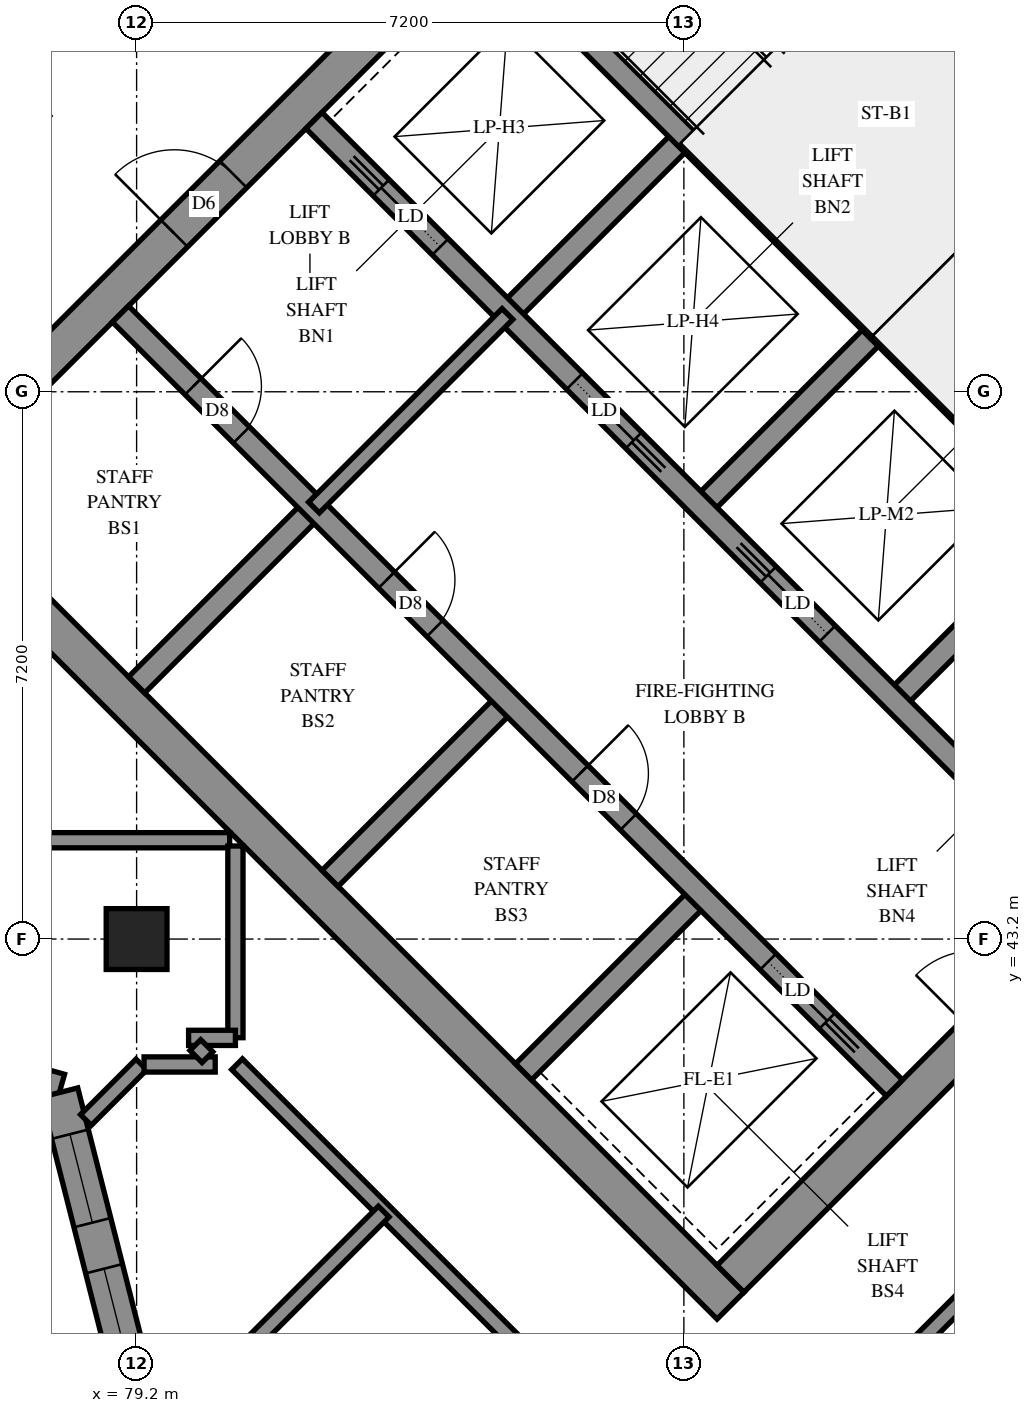
"""IFC4 building model, lengths in metres.
Left out: names, types, materials, properties, quantities, classifications, styles, units other than length and angle.
Written with IfcOpenShell. Run it as: python <this file> out.ifc"""

import sys

from ifc_helpers import new_model, si_unit, direction, frame, frame_2d, origin, origin_2d, place, context, subcontext, project, spatial, polyline, rectangle, outline, extrude, element, fill, save


model = new_model("IFC4")
c1 = context("Model", 3, precision=1e-05, world=origin(), true_north=direction((0.0, 1.0)))
c2 = subcontext(c1, "Body", "Model", "MODEL_VIEW")
j1 = project(units=[si_unit("LENGTHUNIT", "METRE"), si_unit("PLANEANGLEUNIT", "RADIAN")], contexts=[c1])
p1 = place(None, origin())
s1 = spatial("IfcSite", under=j1, at=p1, CompositionType="ELEMENT")
p2 = place(p1, origin())
s2 = spatial("IfcBuilding", under=s1, at=p2, CompositionType="ELEMENT")
p3 = place(p2, frame((0.0, 0.0, 203.2)))
s3 = spatial("IfcBuildingStorey", under=s2, at=p3, CompositionType="ELEMENT", Elevation=203.2)
p4 = place(p3, frame((79.2, 43.2, 0.0), z_axis=(0.0, 0.0, 1.0), x_axis=(1.0, 0.0, 0.0)))
e1 = element("IfcColumn", 1, at=p4, inside=s3, PredefinedType="COLUMN", context=c2, shape_type="SweptSolid", body=[
    extrude(rectangle(XDim=0.8, YDim=0.8, at=origin_2d()), origin(), (0.0, 0.0, 1.0), 3.1),
])
p5 = place(p3, frame((76.124, 49.267, -0.3), z_axis=(0.0, 0.0, 1.0), x_axis=(0.7071067812, -0.7071067812, 0.0)))
e2 = element("IfcWall", 2, at=p5, inside=s3, PredefinedType="SHEAR", context=c2, shape_type="SweptSolid", body=[
    extrude(rectangle(XDim=15.4, YDim=0.5, at=frame_2d((7.7, 0.0))), origin(), (0.0, 0.0, 1.0), 2.7),
])
p6 = place(p3, frame((86.66, 59.802, -0.3), z_axis=(0.0, 0.0, 1.0), x_axis=(0.7071067812, -0.7071067812, 0.0)))
e3 = element("IfcWall", 3, at=p6, inside=s3, PredefinedType="SHEAR", context=c2, shape_type="SweptSolid", body=[
    extrude(rectangle(XDim=15.4, YDim=0.5, at=frame_2d((7.7, 0.0))), origin(), (0.0, 0.0, 1.0), 2.7),
])
p7 = place(p6, frame((10.5, 0.0, 0.3)))
e4 = element("IfcOpeningElement", 4, at=p7, cuts=e3, PredefinedType="OPENING", context=c2, shape_type="SweptSolid", body=[
    extrude(rectangle(XDim=0.8, YDim=2.1, at=frame_2d((0.4, 1.05))), frame((0.0, 0.26, 0.0), z_axis=(0.0, -1.0, 0.0), x_axis=(1.0, 0.0, 0.0)), (0.0, 0.0, 1.0), 0.52),
])
p8 = place(p3, frame((76.478, 49.267, -0.3), z_axis=(0.0, 0.0, 1.0), x_axis=(0.7071067812, 0.7071067812, 0.0)))
e5 = element("IfcWall", 5, at=p8, inside=s3, PredefinedType="SHEAR", context=c2, shape_type="SweptSolid", body=[
    extrude(rectangle(XDim=14.4, YDim=0.5, at=frame_2d((7.2, 0.0))), origin(), (0.0, 0.0, 1.0), 2.7),
])
p9 = place(p8, frame((4.55, 0.0, 0.3)))
e6 = element("IfcOpeningElement", 6, at=p9, cuts=e5, PredefinedType="OPENING", context=c2, shape_type="SweptSolid", body=[
    extrude(rectangle(XDim=1.1, YDim=2.1, at=frame_2d((0.55, 1.05))), frame((0.0, 0.26, 0.0), z_axis=(0.0, -1.0, 0.0), x_axis=(1.0, 0.0, 0.0)), (0.0, 0.0, 1.0), 0.52),
])
p10 = place(p8, frame((11.35, 0.0, 0.3)))
e7 = element("IfcOpeningElement", 7, at=p10, cuts=e5, PredefinedType="OPENING", context=c2, shape_type="SweptSolid", body=[
    extrude(rectangle(XDim=1.1, YDim=2.1, at=frame_2d((0.55, 1.05))), frame((0.0, 0.26, 0.0), z_axis=(0.0, -1.0, 0.0), x_axis=(1.0, 0.0, 0.0)), (0.0, 0.0, 1.0), 0.52),
])
p11 = place(p3, frame((87.013, 38.731, -0.3), z_axis=(0.0, 0.0, 1.0), x_axis=(0.7071067812, 0.7071067812, 0.0)))
e8 = element("IfcWall", 8, at=p11, inside=s3, PredefinedType="SHEAR", context=c2, shape_type="SweptSolid", body=[
    extrude(rectangle(XDim=14.4, YDim=0.5, at=frame_2d((7.2, 0.0))), origin(), (0.0, 0.0, 1.0), 2.7),
])
p12 = place(p11, frame((4.55, 0.0, 0.3)))
e9 = element("IfcOpeningElement", 9, at=p12, cuts=e8, PredefinedType="OPENING", context=c2, shape_type="SweptSolid", body=[
    extrude(rectangle(XDim=1.1, YDim=2.1, at=frame_2d((0.55, 1.05))), frame((0.0, 0.26, 0.0), z_axis=(0.0, -1.0, 0.0), x_axis=(1.0, 0.0, 0.0)), (0.0, 0.0, 1.0), 0.52),
])
p13 = place(p11, frame((11.35, 0.0, 0.3)))
e10 = element("IfcOpeningElement", 10, at=p13, cuts=e8, PredefinedType="OPENING", context=c2, shape_type="SweptSolid", body=[
    extrude(rectangle(XDim=1.1, YDim=2.1, at=frame_2d((0.55, 1.05))), frame((0.0, 0.26, 0.0), z_axis=(0.0, -1.0, 0.0), x_axis=(1.0, 0.0, 0.0)), (0.0, 0.0, 1.0), 0.52),
])
for number, where, z_axis, x_axis in (
    (11, (79.2, 46.544, 0.0), (0.0, 0.0, 1.0), (0.707, 0.707, 0.0)),
    (12, (84.079, 51.423, 0.0), (0.0, 0.0, 1.0), (0.707, 0.707, 0.0)),
):
    element("IfcWall", number, at=place(p3, frame(where, z_axis=z_axis, x_axis=x_axis)), inside=s3, PredefinedType="SOLIDWALL", context=c2, shape_type="SweptSolid", body=[
        extrude(rectangle(XDim=3.3, YDim=0.3, at=frame_2d((1.65, 0.0))), origin(), (0.0, 0.0, 1.0), 3.1),
    ])
p14 = place(p3, frame((81.746, 43.999, 0.0), z_axis=(0.0, 0.0, 1.0), x_axis=(0.7071067812, 0.7071067812, 0.0)))
e13 = element("IfcWall", 13, at=p14, inside=s3, PredefinedType="SOLIDWALL", context=c2, shape_type="SweptSolid", body=[
    extrude(rectangle(XDim=3.3, YDim=0.3, at=frame_2d((1.65, 0.0))), origin(), (0.0, 0.0, 1.0), 3.1),
])
p15 = place(p3, frame((86.625, 48.878, 0.0), z_axis=(0.0, 0.0, 1.0), x_axis=(0.7071067812, 0.7071067812, 0.0)))
e14 = element("IfcWall", 14, at=p15, inside=s3, PredefinedType="SOLIDWALL", context=c2, shape_type="SweptSolid", body=[
    extrude(rectangle(XDim=3.3, YDim=0.3, at=frame_2d((1.65, 0.0))), origin(), (0.0, 0.0, 1.0), 3.1),
])
p16 = place(p3, frame((84.291, 41.453, 0.0), z_axis=(0.0, 0.0, 1.0), x_axis=(0.7071067812, 0.7071067812, 0.0)))
e15 = element("IfcWall", 15, at=p16, inside=s3, PredefinedType="SOLIDWALL", context=c2, shape_type="SweptSolid", body=[
    extrude(rectangle(XDim=3.3, YDim=0.3, at=frame_2d((1.65, 0.0))), origin(), (0.0, 0.0, 1.0), 3.1),
])
p17 = place(p3, frame((89.17, 46.332, 0.0), z_axis=(0.0, 0.0, 1.0), x_axis=(0.7071067812, 0.7071067812, 0.0)))
e16 = element("IfcWall", 16, at=p17, inside=s3, PredefinedType="SOLIDWALL", context=c2, shape_type="SweptSolid", body=[
    extrude(rectangle(XDim=3.3, YDim=0.3, at=frame_2d((1.65, 0.0))), origin(), (0.0, 0.0, 1.0), 3.1),
])
p18 = place(p3, frame((78.988, 51.423, 0.0), z_axis=(0.0, 0.0, 1.0), x_axis=(0.7071067812, -0.7071067812, 0.0)))
e17 = element("IfcWall", 17, at=p18, inside=s3, PredefinedType="SOLIDWALL", context=c2, shape_type="SweptSolid", body=[
    extrude(rectangle(XDim=14.4, YDim=0.3, at=frame_2d((7.2, 0.0))), origin(), (0.0, 0.0, 1.0), 3.1),
])
p19 = place(p18, frame((1.35, 0.0, 0.0)))
e18 = element("IfcOpeningElement", 18, at=p19, cuts=e17, PredefinedType="OPENING", context=c2, shape_type="SweptSolid", body=[
    extrude(rectangle(XDim=0.9, YDim=2.1, at=frame_2d((0.45, 1.05))), frame((0.0, 0.16, 0.0), z_axis=(0.0, -1.0, 0.0), x_axis=(1.0, 0.0, 0.0)), (0.0, 0.0, 1.0), 0.32),
])
p20 = place(p18, frame((4.95, 0.0, 0.0)))
e19 = element("IfcOpeningElement", 19, at=p20, cuts=e17, PredefinedType="OPENING", context=c2, shape_type="SweptSolid", body=[
    extrude(rectangle(XDim=0.9, YDim=2.1, at=frame_2d((0.45, 1.05))), frame((0.0, 0.16, 0.0), z_axis=(0.0, -1.0, 0.0), x_axis=(1.0, 0.0, 0.0)), (0.0, 0.0, 1.0), 0.32),
])
p21 = place(p18, frame((8.55, 0.0, 0.0)))
e20 = element("IfcOpeningElement", 20, at=p21, cuts=e17, PredefinedType="OPENING", context=c2, shape_type="SweptSolid", body=[
    extrude(rectangle(XDim=0.9, YDim=2.1, at=frame_2d((0.45, 1.05))), frame((0.0, 0.16, 0.0), z_axis=(0.0, -1.0, 0.0), x_axis=(1.0, 0.0, 0.0)), (0.0, 0.0, 1.0), 0.32),
])
p22 = place(p18, frame((12.05, 0.0, 0.0)))
e21 = element("IfcOpeningElement", 21, at=p22, cuts=e17, PredefinedType="OPENING", context=c2, shape_type="SweptSolid", body=[
    extrude(rectangle(XDim=1.1, YDim=2.1, at=frame_2d((0.55, 1.05))), frame((0.0, 0.16, 0.0), z_axis=(0.0, -1.0, 0.0), x_axis=(1.0, 0.0, 0.0)), (0.0, 0.0, 1.0), 0.32),
])
p23 = place(p3, frame((81.534, 53.969, 0.0), z_axis=(0.0, 0.0, 1.0), x_axis=(0.707103309, -0.7071102534, 0.0)))
e22 = element("IfcWall", 22, at=p23, inside=s3, PredefinedType="SOLIDWALL", context=c2, shape_type="SweptSolid", body=[
    extrude(rectangle(XDim=14.4, YDim=0.3, at=frame_2d((7.2, 0.0))), origin(), (0.0, 0.0, 1.0), 3.1),
])
p24 = place(p23, frame((1.25, 0.0, 0.0)))
e23 = element("IfcOpeningElement", 23, at=p24, cuts=e22, PredefinedType="OPENING", context=c2, shape_type="SweptSolid", body=[
    extrude(rectangle(XDim=1.1, YDim=2.1, at=frame_2d((0.55, 1.05))), frame((0.0, 0.16, 0.0), z_axis=(0.0, -1.0, 0.0), x_axis=(1.0, 0.0, 0.0)), (0.0, 0.0, 1.0), 0.32),
])
p25 = place(p23, frame((4.85, 0.0, 0.0)))
e24 = element("IfcOpeningElement", 24, at=p25, cuts=e22, PredefinedType="OPENING", context=c2, shape_type="SweptSolid", body=[
    extrude(rectangle(XDim=1.1, YDim=2.1, at=frame_2d((0.55, 1.05))), frame((0.0, 0.16, 0.0), z_axis=(0.0, -1.0, 0.0), x_axis=(1.0, 0.0, 0.0)), (0.0, 0.0, 1.0), 0.32),
])
p26 = place(p23, frame((8.45, 0.0, 0.0)))
e25 = element("IfcOpeningElement", 25, at=p26, cuts=e22, PredefinedType="OPENING", context=c2, shape_type="SweptSolid", body=[
    extrude(rectangle(XDim=1.1, YDim=2.1, at=frame_2d((0.55, 1.05))), frame((0.0, 0.16, 0.0), z_axis=(0.0, -1.0, 0.0), x_axis=(1.0, 0.0, 0.0)), (0.0, 0.0, 1.0), 0.32),
])
p27 = place(p23, frame((12.05, 0.0, 0.0)))
e26 = element("IfcOpeningElement", 26, at=p27, cuts=e22, PredefinedType="OPENING", context=c2, shape_type="SweptSolid", body=[
    extrude(rectangle(XDim=1.1, YDim=2.1, at=frame_2d((0.55, 1.05))), frame((0.0, 0.16, 0.0), z_axis=(0.0, -1.0, 0.0), x_axis=(1.0, 0.0, 0.0)), (0.0, 0.0, 1.0), 0.32),
])
for number, where, z_axis, x_axis in (
    (27, (83.867, 56.302, 0.0), (0.0, 0.0, 1.0), (0.707, -0.707, 0.0)),
    (28, (88.958, 51.211, 0.0), (0.0, 0.0, 1.0), (0.707, -0.707, 0.0)),
):
    element("IfcWall", number, at=place(p3, frame(where, z_axis=z_axis, x_axis=x_axis)), inside=s3, PredefinedType="SOLIDWALL", context=c2, shape_type="SweptSolid", body=[
        extrude(rectangle(XDim=7.2, YDim=0.3, at=frame_2d((3.6, 0.0))), origin(), (0.0, 0.0, 1.0), 3.1),
    ])
p28 = place(p3, frame((88.958, 51.211, 0.0), z_axis=(0.0, 0.0, 1.0), x_axis=(0.7071067812, 0.7071067812, 0.0)))
e29 = element("IfcWall", 29, at=p28, inside=s3, PredefinedType="SOLIDWALL", context=c2, shape_type="SweptSolid", body=[
    extrude(rectangle(XDim=4.2, YDim=0.3, at=frame_2d((2.1, 0.0))), origin(), (0.0, 0.0, 1.0), 3.1),
])
p29 = place(p3, frame((74.4, 42.254, 0.0), z_axis=(0.0, 0.0, 1.0), x_axis=(0.9620012555, -0.2730450228, 0.0)))
e30 = element("IfcWall", 30, at=p29, inside=s3, PredefinedType="SOLIDWALL", context=c2, shape_type="SweptSolid", body=[
    extrude(outline(polyline([(0.05, -0.25), (3.789, -0.25), (4.077, 0.25), (-0.05, 0.25), (0.05, -0.25)])), origin(), (0.0, 0.0, 1.0), 3.1),
])
p30 = place(p29, frame((0.405, 0.0, 0.5)))
e31 = element("IfcOpeningElement", 31, at=p30, cuts=e30, PredefinedType="OPENING", context=c2, shape_type="SweptSolid", body=[
    extrude(rectangle(XDim=1.2, YDim=2.45, at=frame_2d((0.6, 1.225))), frame((0.0, 0.26, 0.0), z_axis=(0.0, -1.0, 0.0), x_axis=(1.0, 0.0, 0.0)), (0.0, 0.0, 1.0), 0.52),
])
p31 = place(p29, frame((2.079, 0.0, 0.45)))
e32 = element("IfcOpeningElement", 32, at=p31, cuts=e30, PredefinedType="OPENING", context=c2, shape_type="SweptSolid", body=[
    extrude(rectangle(XDim=0.8, YDim=2.5, at=frame_2d((0.4, 1.25))), frame((0.0, 0.26, 0.0), z_axis=(0.0, -1.0, 0.0), x_axis=(1.0, 0.0, 0.0)), (0.0, 0.0, 1.0), 0.52),
])
p32 = place(p3, frame((78.184, 41.18, 0.0), z_axis=(0.0, 0.0, 1.0), x_axis=(0.2459826289, -0.9692742369, 0.0)))
e33 = element("IfcWall", 33, at=p32, inside=s3, PredefinedType="SOLIDWALL", context=c2, shape_type="SweptSolid", body=[
    extrude(outline(polyline([(0.144, -0.25), (4.837, -0.25), (4.552, 0.25), (-0.144, 0.25), (0.144, -0.25)])), origin(), (0.0, 0.0, 1.0), 3.1),
])
p33 = place(p32, frame((0.565, 0.0, 0.45)))
e34 = element("IfcOpeningElement", 34, at=p33, cuts=e33, PredefinedType="OPENING", context=c2, shape_type="SweptSolid", body=[
    extrude(rectangle(XDim=1.2, YDim=2.5, at=frame_2d((0.6, 1.25))), frame((0.0, 0.26, 0.0), z_axis=(0.0, -1.0, 0.0), x_axis=(1.0, 0.0, 0.0)), (0.0, 0.0, 1.0), 0.52),
])
p34 = place(p32, frame((2.391, 0.0, 0.45)))
e35 = element("IfcOpeningElement", 35, at=p34, cuts=e33, PredefinedType="OPENING", context=c2, shape_type="SweptSolid", body=[
    extrude(rectangle(XDim=1.2, YDim=2.5, at=frame_2d((0.6, 1.25))), frame((0.0, 0.26, 0.0), z_axis=(0.0, -1.0, 0.0), x_axis=(1.0, 0.0, 0.0)), (0.0, 0.0, 1.0), 0.52),
])
p35 = place(p3, frame((81.534, 48.878, 0.0), z_axis=(0.0, 0.0, 1.0), x_axis=(0.707092892, 0.7071206701, 0.0)))
e36 = element("IfcWall", 36, at=p35, inside=s3, PredefinedType="PARTITIONING", context=c2, shape_type="SweptSolid", body=[
    extrude(rectangle(XDim=3.6, YDim=0.2, at=frame_2d((1.8, 0.0))), origin(), (0.0, 0.0, 1.0), 3.1),
])
p36 = place(p3, frame((84.99, 31.971, 0.0), z_axis=(0.0, 0.0, 1.0), x_axis=(0.7071067812, 0.7071067812, 0.0)))
e37 = element("IfcWall", 37, at=p36, inside=s3, PredefinedType="PARTITIONING", context=c2, shape_type="SweptSolid", body=[
    extrude(rectangle(XDim=8.711, YDim=0.2, at=frame_2d((4.356, 0.0))), origin(), (0.0, 0.0, 1.0), 3.1),
])
p37 = place(p3, frame((86.835, 35.231, 0.0), z_axis=(0.0, 0.0, 1.0), x_axis=(0.7071067812, 0.7071067812, 0.0)))
e38 = element("IfcWall", 38, at=p37, inside=s3, PredefinedType="PARTITIONING", context=c2, shape_type="SweptSolid", body=[
    extrude(rectangle(XDim=7.501, YDim=0.2, at=frame_2d((3.751, 0.0))), origin(), (0.0, 0.0, 1.0), 3.1),
])
p38 = place(p37, frame((6.243, 0.0, 0.0)))
e39 = element("IfcOpeningElement", 39, at=p38, cuts=e38, PredefinedType="OPENING", context=c2, shape_type="SweptSolid", body=[
    extrude(rectangle(XDim=1.0, YDim=2.1, at=frame_2d((0.5, 1.05))), frame((0.0, 0.11, 0.0), z_axis=(0.0, -1.0, 0.0), x_axis=(1.0, 0.0, 0.0)), (0.0, 0.0, 1.0), 0.22),
])
p39 = place(p3, frame((80.522, 41.553, 0.0), z_axis=(0.0, 0.0, 1.0), x_axis=(0.7071067812, -0.7071067812, 0.0)))
e40 = element("IfcWall", 40, at=p39, inside=s3, PredefinedType="PARTITIONING", context=c2, shape_type="SweptSolid", body=[
    extrude(rectangle(XDim=6.836, YDim=0.2, at=frame_2d((3.418, 0.0))), origin(), (0.0, 0.0, 1.0), 3.1),
])
p40 = place(p3, frame((79.639, 36.803, 0.0), z_axis=(0.0, 0.0, 1.0), x_axis=(0.707119353, 0.7070942092, 0.0)))
e41 = element("IfcWall", 41, at=p40, inside=s3, PredefinedType="PARTITIONING", context=c2, shape_type="SweptSolid", body=[
    extrude(rectangle(XDim=3.977, YDim=0.2, at=frame_2d((1.989, 0.0))), origin(), (0.0, 0.0, 1.0), 3.1),
])
for number, where, z_axis, x_axis in (
    (42, (77.902, 44.5, 0.0), (0.0, 0.0, 1.0), (1.0, 0.0, 0.0)),
    (43, (80.5, 41.902, 0.0), (0.0, 0.0, 1.0), (0.0, 1.0, 0.0)),
):
    element("IfcWall", number, at=place(p3, frame(where, z_axis=z_axis, x_axis=x_axis)), inside=s3, PredefinedType="PARTITIONING", context=c2, shape_type="SweptSolid", body=[
        extrude(rectangle(XDim=2.522, YDim=0.2, at=frame_2d((1.261, 0.0))), origin(), (0.0, 0.0, 1.0), 3.1),
    ])
p41 = place(p3, frame((78.533, 40.82, 0.0), z_axis=(0.0, 0.0, 1.0), x_axis=(0.7071067812, 0.7071067812, 0.0)))
e44 = element("IfcWall", 44, at=p41, inside=s3, PredefinedType="PARTITIONING", context=c2, shape_type="SweptSolid", body=[
    extrude(rectangle(XDim=1.032, YDim=0.2, at=frame_2d((0.516, 0.0))), origin(), (0.0, 0.0, 1.0), 3.1),
])
p42 = place(p3, frame((79.298, 41.55, 0.0), z_axis=(0.0, 0.0, 1.0), x_axis=(1.0, 0.0, 0.0)))
e45 = element("IfcWall", 45, at=p42, inside=s3, PredefinedType="PARTITIONING", context=c2, shape_type="SweptSolid", body=[
    extrude(rectangle(XDim=0.936, YDim=0.2, at=frame_2d((0.468, 0.0))), origin(), (0.0, 0.0, 1.0), 3.1),
])
p43 = place(p3, frame((79.884, 41.9, 0.0), z_axis=(0.0, 0.0, 1.0), x_axis=(1.0, 0.0, 0.0)))
e46 = element("IfcWall", 46, at=p43, inside=s3, PredefinedType="PARTITIONING", context=c2, shape_type="SweptSolid", body=[
    extrude(rectangle(XDim=0.616, YDim=0.2, at=frame_2d((0.308, 0.0))), origin(), (0.0, 0.0, 1.0), 3.1),
])
p44 = place(p3, frame((79.973, 41.805, 0.0), z_axis=(0.0, 0.0, 1.0), x_axis=(0.707329037, -0.7068844555, 0.0)))
e47 = element("IfcWall", 47, at=p44, inside=s3, PredefinedType="PARTITIONING", context=c2, shape_type="SweptSolid", body=[
    extrude(rectangle(XDim=0.225, YDim=0.2, at=frame_2d((0.112, 0.0))), origin(), (0.0, 0.0, 1.0), 3.1),
])
p45 = place(p33, origin())
e48 = element("IfcWindow", 48, at=p45, inside=s3, PartitioningType="SINGLE_PANEL", PredefinedType="WINDOW", context=c2, shape_type="SweptSolid", body=[
    extrude(rectangle(XDim=1.2, YDim=2.5, at=frame_2d((0.6, 1.25))), frame((0.0, 0.18, 0.0), z_axis=(0.0, -1.0, 0.0), x_axis=(1.0, 0.0, 0.0)), (0.0, 0.0, 1.0), 0.06),
])
fill(e34, e48)
p46 = place(p34, origin())
e49 = element("IfcWindow", 49, at=p46, inside=s3, PartitioningType="SINGLE_PANEL", PredefinedType="WINDOW", context=c2, shape_type="SweptSolid", body=[
    extrude(rectangle(XDim=1.2, YDim=2.5, at=frame_2d((0.6, 1.25))), frame((0.0, 0.18, 0.0), z_axis=(0.0, -1.0, 0.0), x_axis=(1.0, 0.0, 0.0)), (0.0, 0.0, 1.0), 0.06),
])
fill(e35, e49)
p47 = place(p9, origin())
e50 = element("IfcDoor", 50, at=p47, inside=s3, OperationType="DOUBLE_DOOR_SINGLE_SWING", PredefinedType="DOOR", context=c2, shape_type="SweptSolid", body=[
    extrude(rectangle(XDim=1.1, YDim=2.1, at=frame_2d((0.55, 1.05))), frame((0.0, 0.025, 0.0), z_axis=(0.0, -1.0, 0.0), x_axis=(1.0, 0.0, 0.0)), (0.0, 0.0, 1.0), 0.05),
])
fill(e6, e50)
p48 = place(p19, origin())
e51 = element("IfcDoor", 51, at=p48, inside=s3, OperationType="SINGLE_SWING_LEFT", PredefinedType="DOOR", context=c2, shape_type="SweptSolid", body=[
    extrude(rectangle(XDim=0.9, YDim=2.1, at=frame_2d((0.45, 1.05))), frame((0.0, 0.025, 0.0), z_axis=(0.0, -1.0, 0.0), x_axis=(1.0, 0.0, 0.0)), (0.0, 0.0, 1.0), 0.05),
])
fill(e18, e51)
p49 = place(p20, origin())
e52 = element("IfcDoor", 52, at=p49, inside=s3, OperationType="SINGLE_SWING_LEFT", PredefinedType="DOOR", context=c2, shape_type="SweptSolid", body=[
    extrude(rectangle(XDim=0.9, YDim=2.1, at=frame_2d((0.45, 1.05))), frame((0.0, 0.025, 0.0), z_axis=(0.0, -1.0, 0.0), x_axis=(1.0, 0.0, 0.0)), (0.0, 0.0, 1.0), 0.05),
])
fill(e19, e52)
p50 = place(p21, origin())
e53 = element("IfcDoor", 53, at=p50, inside=s3, OperationType="SINGLE_SWING_LEFT", PredefinedType="DOOR", context=c2, shape_type="SweptSolid", body=[
    extrude(rectangle(XDim=0.9, YDim=2.1, at=frame_2d((0.45, 1.05))), frame((0.0, 0.025, 0.0), z_axis=(0.0, -1.0, 0.0), x_axis=(1.0, 0.0, 0.0)), (0.0, 0.0, 1.0), 0.05),
])
fill(e20, e53)
p51 = place(p22, origin())
e54 = element("IfcDoor", 54, at=p51, inside=s3, OperationType="SLIDING_TO_RIGHT", PredefinedType="DOOR", context=c2, shape_type="SweptSolid", body=[
    extrude(rectangle(XDim=1.1, YDim=2.1, at=frame_2d((0.55, 1.05))), frame((0.0, 0.025, 0.0), z_axis=(0.0, -1.0, 0.0), x_axis=(1.0, 0.0, 0.0)), (0.0, 0.0, 1.0), 0.05),
])
fill(e21, e54)
p52 = place(p24, origin())
e55 = element("IfcDoor", 55, at=p52, inside=s3, OperationType="SLIDING_TO_LEFT", PredefinedType="DOOR", context=c2, shape_type="SweptSolid", body=[
    extrude(rectangle(XDim=1.1, YDim=2.1, at=frame_2d((0.55, 1.05))), frame((0.0, 0.025, 0.0), z_axis=(0.0, -1.0, 0.0), x_axis=(1.0, 0.0, 0.0)), (0.0, 0.0, 1.0), 0.05),
])
fill(e23, e55)
p53 = place(p25, origin())
e56 = element("IfcDoor", 56, at=p53, inside=s3, OperationType="SLIDING_TO_RIGHT", PredefinedType="DOOR", context=c2, shape_type="SweptSolid", body=[
    extrude(rectangle(XDim=1.1, YDim=2.1, at=frame_2d((0.55, 1.05))), frame((0.0, 0.025, 0.0), z_axis=(0.0, -1.0, 0.0), x_axis=(1.0, 0.0, 0.0)), (0.0, 0.0, 1.0), 0.05),
])
fill(e24, e56)
p54 = place(p26, origin())
e57 = element("IfcDoor", 57, at=p54, inside=s3, OperationType="SLIDING_TO_LEFT", PredefinedType="DOOR", context=c2, shape_type="SweptSolid", body=[
    extrude(rectangle(XDim=1.1, YDim=2.1, at=frame_2d((0.55, 1.05))), frame((0.0, 0.025, 0.0), z_axis=(0.0, -1.0, 0.0), x_axis=(1.0, 0.0, 0.0)), (0.0, 0.0, 1.0), 0.05),
])
fill(e25, e57)
save(model, sys.argv[1])
